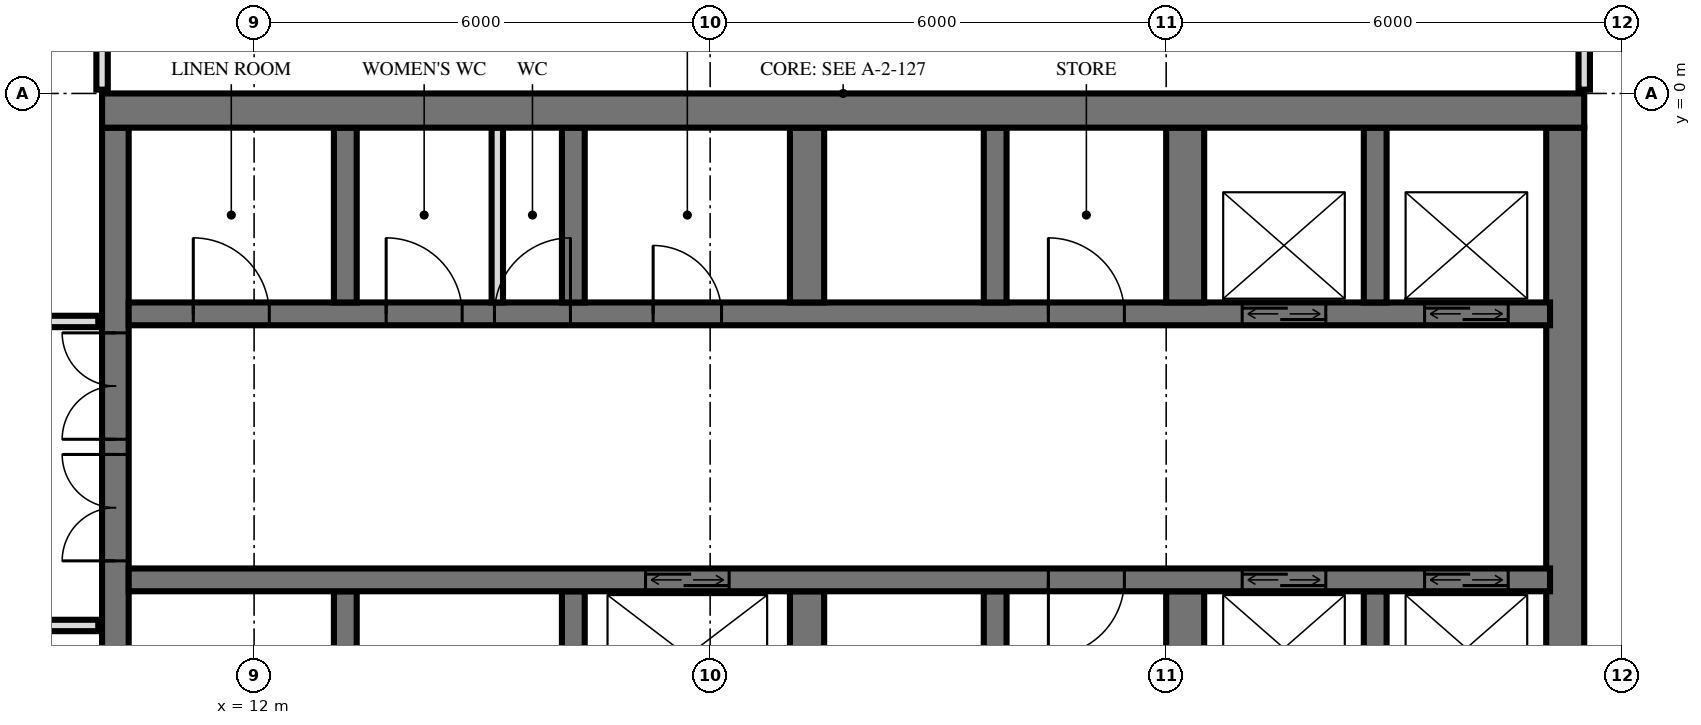
"""IFC4 building model, lengths in metres.
Left out: names, types, materials, properties, quantities, classifications, styles, units other than length and angle.
Written with IfcOpenShell. Run it as: python <this file> out.ifc"""

import sys

from ifc_helpers import new_model, si_unit, direction, frame, frame_2d, origin, place, context, subcontext, project, spatial, rectangle, extrude, element, fill, save


model = new_model("IFC4")
c1 = context("Model", 3, precision=1e-05, world=origin(), true_north=direction((0.0, 1.0)))
c2 = subcontext(c1, "Body", "Model", "MODEL_VIEW")
j1 = project(units=[si_unit("LENGTHUNIT", "METRE"), si_unit("PLANEANGLEUNIT", "RADIAN")], contexts=[c1])
p1 = place(None, origin())
s1 = spatial("IfcSite", under=j1, at=p1, CompositionType="ELEMENT")
p2 = place(p1, origin())
s2 = spatial("IfcBuilding", under=s1, at=p2, CompositionType="ELEMENT")
p3 = place(p2, frame((0.0, 0.0, 42.0)))
s3 = spatial("IfcBuildingStorey", under=s2, at=p3, CompositionType="ELEMENT", Elevation=42.0)
p4 = place(p3, frame((10.0, -0.225, 0.0), z_axis=(0.0, 0.0, 1.0), x_axis=(1.0, 0.0, 0.0)))
e1 = element("IfcWall", 1, at=p4, inside=s3, PredefinedType="SHEAR", context=c2, shape_type="SweptSolid", body=[
    extrude(rectangle(XDim=19.5, YDim=0.45, at=frame_2d((9.75, 0.0))), origin(), (0.0, 0.0, 1.0), 3.6),
])
p5 = place(p3, frame((10.175, -14.55, 0.0), z_axis=(0.0, 0.0, 1.0), x_axis=(0.0, 1.0, 0.0)))
e2 = element("IfcWall", 2, at=p5, inside=s3, PredefinedType="SHEAR", context=c2, shape_type="SweptSolid", body=[
    extrude(rectangle(XDim=14.1, YDim=0.35, at=frame_2d((7.05, 0.0))), origin(), (0.0, 0.0, 1.0), 3.6),
])
p6 = place(p5, frame((8.4, 0.0, 0.0)))
e3 = element("IfcOpeningElement", 3, at=p6, cuts=e2, PredefinedType="OPENING", context=c2, shape_type="SweptSolid", body=[
    extrude(rectangle(XDim=1.4, YDim=2.4, at=frame_2d((0.7, 1.2))), frame((0.0, 0.185, 0.0), z_axis=(0.0, -1.0, 0.0), x_axis=(1.0, 0.0, 0.0)), (0.0, 0.0, 1.0), 0.37),
])
p7 = place(p5, frame((10.0, 0.0, 0.0)))
e4 = element("IfcOpeningElement", 4, at=p7, cuts=e2, PredefinedType="OPENING", context=c2, shape_type="SweptSolid", body=[
    extrude(rectangle(XDim=1.4, YDim=2.4, at=frame_2d((0.7, 1.2))), frame((0.0, 0.185, 0.0), z_axis=(0.0, -1.0, 0.0), x_axis=(1.0, 0.0, 0.0)), (0.0, 0.0, 1.0), 0.37),
])
p8 = place(p5, frame((4.0, 0.0, 0.0)))
e5 = element("IfcOpeningElement", 5, at=p8, cuts=e2, PredefinedType="OPENING", context=c2, shape_type="SweptSolid", body=[
    extrude(rectangle(XDim=1.2, YDim=2.1, at=frame_2d((0.6, 1.05))), frame((0.0, 0.185, 0.0), z_axis=(0.0, -1.0, 0.0), x_axis=(1.0, 0.0, 0.0)), (0.0, 0.0, 1.0), 0.37),
])
p9 = place(p3, frame((29.25, -14.55, 0.0), z_axis=(0.0, 0.0, 1.0), x_axis=(0.0, 1.0, 0.0)))
e6 = element("IfcWall", 6, at=p9, inside=s3, PredefinedType="SHEAR", context=c2, shape_type="SweptSolid", body=[
    extrude(rectangle(XDim=14.1, YDim=0.5, at=frame_2d((7.05, 0.0))), origin(), (0.0, 0.0, 1.0), 3.6),
])
p10 = place(p3, frame((10.35, -2.9, 0.0), z_axis=(0.0, 0.0, 1.0), x_axis=(1.0, 0.0, 0.0)))
e7 = element("IfcWall", 7, at=p10, inside=s3, PredefinedType="SHEAR", context=c2, shape_type="SweptSolid", body=[
    extrude(rectangle(XDim=18.7, YDim=0.3, at=frame_2d((9.35, 0.0))), origin(), (0.0, 0.0, 1.0), 3.6),
])
p11 = place(p10, frame((14.65, 0.0, 0.0)))
e8 = element("IfcOpeningElement", 8, at=p11, cuts=e7, PredefinedType="OPENING", context=c2, shape_type="SweptSolid", body=[
    extrude(rectangle(XDim=1.1, YDim=2.1, at=frame_2d((0.55, 1.05))), frame((0.0, 0.16, 0.0), z_axis=(0.0, -1.0, 0.0), x_axis=(1.0, 0.0, 0.0)), (0.0, 0.0, 1.0), 0.32),
])
p12 = place(p10, frame((17.05, 0.0, 0.0)))
e9 = element("IfcOpeningElement", 9, at=p12, cuts=e7, PredefinedType="OPENING", context=c2, shape_type="SweptSolid", body=[
    extrude(rectangle(XDim=1.1, YDim=2.1, at=frame_2d((0.55, 1.05))), frame((0.0, 0.16, 0.0), z_axis=(0.0, -1.0, 0.0), x_axis=(1.0, 0.0, 0.0)), (0.0, 0.0, 1.0), 0.32),
])
p13 = place(p10, frame((6.9, 0.0, 0.0)))
e10 = element("IfcOpeningElement", 10, at=p13, cuts=e7, PredefinedType="OPENING", context=c2, shape_type="SweptSolid", body=[
    extrude(rectangle(XDim=0.9, YDim=2.1, at=frame_2d((0.45, 1.05))), frame((0.0, 0.16, 0.0), z_axis=(0.0, -1.0, 0.0), x_axis=(1.0, 0.0, 0.0)), (0.0, 0.0, 1.0), 0.32),
])
p14 = place(p10, frame((0.85, 0.0, 0.0)))
e11 = element("IfcOpeningElement", 11, at=p14, cuts=e7, PredefinedType="OPENING", context=c2, shape_type="SweptSolid", body=[
    extrude(rectangle(XDim=1.0, YDim=2.1, at=frame_2d((0.5, 1.05))), frame((0.0, 0.16, 0.0), z_axis=(0.0, -1.0, 0.0), x_axis=(1.0, 0.0, 0.0)), (0.0, 0.0, 1.0), 0.32),
])
p15 = place(p10, frame((3.387, 0.0, 0.0)))
e12 = element("IfcOpeningElement", 12, at=p15, cuts=e7, PredefinedType="OPENING", context=c2, shape_type="SweptSolid", body=[
    extrude(rectangle(XDim=1.0, YDim=2.1, at=frame_2d((0.5, 1.05))), frame((0.0, 0.16, 0.0), z_axis=(0.0, -1.0, 0.0), x_axis=(1.0, 0.0, 0.0)), (0.0, 0.0, 1.0), 0.32),
])
p16 = place(p10, frame((4.812, 0.0, 0.0)))
e13 = element("IfcOpeningElement", 13, at=p16, cuts=e7, PredefinedType="OPENING", context=c2, shape_type="SweptSolid", body=[
    extrude(rectangle(XDim=1.0, YDim=2.1, at=frame_2d((0.5, 1.05))), frame((0.0, 0.16, 0.0), z_axis=(0.0, -1.0, 0.0), x_axis=(1.0, 0.0, 0.0)), (0.0, 0.0, 1.0), 0.32),
])
p17 = place(p10, frame((12.1, 0.0, 0.0)))
e14 = element("IfcOpeningElement", 14, at=p17, cuts=e7, PredefinedType="OPENING", context=c2, shape_type="SweptSolid", body=[
    extrude(rectangle(XDim=1.0, YDim=2.1, at=frame_2d((0.5, 1.05))), frame((0.0, 0.16, 0.0), z_axis=(0.0, -1.0, 0.0), x_axis=(1.0, 0.0, 0.0)), (0.0, 0.0, 1.0), 0.32),
])
p18 = place(p3, frame((10.35, -6.4, 0.0), z_axis=(0.0, 0.0, 1.0), x_axis=(1.0, 0.0, 0.0)))
e15 = element("IfcWall", 15, at=p18, inside=s3, PredefinedType="SHEAR", context=c2, shape_type="SweptSolid", body=[
    extrude(rectangle(XDim=18.7, YDim=0.3, at=frame_2d((9.35, 0.0))), origin(), (0.0, 0.0, 1.0), 3.6),
])
p19 = place(p18, frame((14.65, 0.0, 0.0)))
e16 = element("IfcOpeningElement", 16, at=p19, cuts=e15, PredefinedType="OPENING", context=c2, shape_type="SweptSolid", body=[
    extrude(rectangle(XDim=1.1, YDim=2.1, at=frame_2d((0.55, 1.05))), frame((0.0, 0.16, 0.0), z_axis=(0.0, -1.0, 0.0), x_axis=(1.0, 0.0, 0.0)), (0.0, 0.0, 1.0), 0.32),
])
p20 = place(p18, frame((17.05, 0.0, 0.0)))
e17 = element("IfcOpeningElement", 17, at=p20, cuts=e15, PredefinedType="OPENING", context=c2, shape_type="SweptSolid", body=[
    extrude(rectangle(XDim=1.1, YDim=2.1, at=frame_2d((0.55, 1.05))), frame((0.0, 0.16, 0.0), z_axis=(0.0, -1.0, 0.0), x_axis=(1.0, 0.0, 0.0)), (0.0, 0.0, 1.0), 0.32),
])
p21 = place(p18, frame((6.8, 0.0, 0.0)))
e18 = element("IfcOpeningElement", 18, at=p21, cuts=e15, PredefinedType="OPENING", context=c2, shape_type="SweptSolid", body=[
    extrude(rectangle(XDim=1.1, YDim=2.1, at=frame_2d((0.55, 1.05))), frame((0.0, 0.16, 0.0), z_axis=(0.0, -1.0, 0.0), x_axis=(1.0, 0.0, 0.0)), (0.0, 0.0, 1.0), 0.32),
])
p22 = place(p18, frame((12.1, 0.0, 0.0)))
e19 = element("IfcOpeningElement", 19, at=p22, cuts=e15, PredefinedType="OPENING", context=c2, shape_type="SweptSolid", body=[
    extrude(rectangle(XDim=1.0, YDim=2.1, at=frame_2d((0.5, 1.05))), frame((0.0, 0.16, 0.0), z_axis=(0.0, -1.0, 0.0), x_axis=(1.0, 0.0, 0.0)), (0.0, 0.0, 1.0), 0.32),
])
for number, where, z_axis, x_axis in (
    (20, (13.2, -2.75, 0.0), (0.0, 0.0, 1.0), (0.0, 1.0, 0.0)),
    (21, (13.2, -8.85, 0.0), (0.0, 0.0, 1.0), (0.0, 1.0, 0.0)),
    (22, (16.2, -2.75, 0.0), (0.0, 0.0, 1.0), (0.0, 1.0, 0.0)),
    (23, (16.2, -8.85, 0.0), (0.0, 0.0, 1.0), (0.0, 1.0, 0.0)),
):
    element("IfcWall", number, at=place(p3, frame(where, z_axis=z_axis, x_axis=x_axis)), inside=s3, PredefinedType="SHEAR", context=c2, shape_type="SweptSolid", body=[
        extrude(rectangle(XDim=2.3, YDim=0.3, at=frame_2d((1.15, 0.0))), origin(), (0.0, 0.0, 1.0), 3.6),
    ])
for number, where, z_axis, x_axis in (
    (24, (19.275, -2.75, 0.0), (0.0, 0.0, 1.0), (0.0, 1.0, 0.0)),
    (25, (19.275, -8.85, 0.0), (0.0, 0.0, 1.0), (0.0, 1.0, 0.0)),
):
    element("IfcWall", number, at=place(p3, frame(where, z_axis=z_axis, x_axis=x_axis)), inside=s3, PredefinedType="SHEAR", context=c2, shape_type="SweptSolid", body=[
        extrude(rectangle(XDim=2.3, YDim=0.45, at=frame_2d((1.15, 0.0))), origin(), (0.0, 0.0, 1.0), 3.6),
    ])
for number, where, z_axis, x_axis in (
    (26, (21.75, -2.75, 0.0), (0.0, 0.0, 1.0), (0.0, 1.0, 0.0)),
    (27, (21.75, -8.85, 0.0), (0.0, 0.0, 1.0), (0.0, 1.0, 0.0)),
):
    element("IfcWall", number, at=place(p3, frame(where, z_axis=z_axis, x_axis=x_axis)), inside=s3, PredefinedType="SHEAR", context=c2, shape_type="SweptSolid", body=[
        extrude(rectangle(XDim=2.3, YDim=0.3, at=frame_2d((1.15, 0.0))), origin(), (0.0, 0.0, 1.0), 3.6),
    ])
for number, where, z_axis, x_axis in (
    (28, (24.25, -2.75, 0.0), (0.0, 0.0, 1.0), (0.0, 1.0, 0.0)),
    (29, (24.25, -8.85, 0.0), (0.0, 0.0, 1.0), (0.0, 1.0, 0.0)),
):
    element("IfcWall", number, at=place(p3, frame(where, z_axis=z_axis, x_axis=x_axis)), inside=s3, PredefinedType="SHEAR", context=c2, shape_type="SweptSolid", body=[
        extrude(rectangle(XDim=2.3, YDim=0.5, at=frame_2d((1.15, 0.0))), origin(), (0.0, 0.0, 1.0), 3.6),
    ])
for number, where, z_axis, x_axis in (
    (30, (26.75, -2.75, 0.0), (0.0, 0.0, 1.0), (0.0, 1.0, 0.0)),
    (31, (26.75, -8.85, 0.0), (0.0, 0.0, 1.0), (0.0, 1.0, 0.0)),
):
    element("IfcWall", number, at=place(p3, frame(where, z_axis=z_axis, x_axis=x_axis)), inside=s3, PredefinedType="SHEAR", context=c2, shape_type="SweptSolid", body=[
        extrude(rectangle(XDim=2.3, YDim=0.3, at=frame_2d((1.15, 0.0))), origin(), (0.0, 0.0, 1.0), 3.6),
    ])
p23 = place(p3, frame((15.2, -2.75, 0.0), z_axis=(0.0, 0.0, 1.0), x_axis=(0.0, 1.0, 0.0)))
e32 = element("IfcWall", 32, at=p23, inside=s3, PredefinedType="PARTITIONING", context=c2, shape_type="SweptSolid", body=[
    extrude(rectangle(XDim=2.3, YDim=0.15, at=frame_2d((1.15, 0.0))), origin(), (0.0, 0.0, 1.0), 3.3),
])
p24 = place(p3, frame((29.5, 0.05, 0.0), z_axis=(0.0, 0.0, 1.0), x_axis=(0.0, 1.0, 0.0)))
e33 = element("IfcWall", 33, at=p24, inside=s3, PredefinedType="PARTITIONING", context=c2, shape_type="SweptSolid", body=[
    extrude(rectangle(XDim=0.827, YDim=0.15, at=frame_2d((0.414, 0.0))), origin(), (0.0, 0.0, 1.0), 3.32),
])
p25 = place(p3, frame((10.0, 0.05, 0.0), z_axis=(0.0, 0.0, 1.0), x_axis=(0.0, 1.0, 0.0)))
e34 = element("IfcWall", 34, at=p25, inside=s3, PredefinedType="PARTITIONING", context=c2, shape_type="SweptSolid", body=[
    extrude(rectangle(XDim=0.97, YDim=0.15, at=frame_2d((0.485, 0.0))), origin(), (0.0, 0.0, 1.0), 3.32),
])
p26 = place(p3, frame((-9.95, -7.0, 0.0), z_axis=(0.0, 0.0, 1.0), x_axis=(1.0, 0.0, 0.0)))
e35 = element("IfcWall", 35, at=p26, inside=s3, PredefinedType="PARTITIONING", context=c2, shape_type="SweptSolid", body=[
    extrude(rectangle(XDim=19.9, YDim=0.15, at=frame_2d((9.95, 0.0))), origin(), (0.0, 0.0, 1.0), 3.32),
])
p27 = place(p26, frame((9.45, 0.0, 0.0)))
e36 = element("IfcOpeningElement", 36, at=p27, cuts=e35, PredefinedType="OPENING", context=c2, shape_type="SweptSolid", body=[
    extrude(rectangle(XDim=1.0, YDim=2.1, at=frame_2d((0.5, 1.05))), frame((0.0, 0.085, 0.0), z_axis=(0.0, -1.0, 0.0), x_axis=(1.0, 0.0, 0.0)), (0.0, 0.0, 1.0), 0.17),
])
p28 = place(p26, frame((15.45, 0.0, 0.0)))
e37 = element("IfcOpeningElement", 37, at=p28, cuts=e35, PredefinedType="OPENING", context=c2, shape_type="SweptSolid", body=[
    extrude(rectangle(XDim=1.0, YDim=2.1, at=frame_2d((0.5, 1.05))), frame((0.0, 0.085, 0.0), z_axis=(0.0, -1.0, 0.0), x_axis=(1.0, 0.0, 0.0)), (0.0, 0.0, 1.0), 0.17),
])
p29 = place(p3, frame((-9.95, -3.0, 0.0), z_axis=(0.0, 0.0, 1.0), x_axis=(1.0, 0.0, 0.0)))
e38 = element("IfcWall", 38, at=p29, inside=s3, PredefinedType="PARTITIONING", context=c2, shape_type="SweptSolid", body=[
    extrude(rectangle(XDim=19.9, YDim=0.15, at=frame_2d((9.95, 0.0))), origin(), (0.0, 0.0, 1.0), 3.32),
])
p30 = place(p29, frame((1.7, 0.0, 0.0)))
e39 = element("IfcOpeningElement", 39, at=p30, cuts=e38, PredefinedType="OPENING", context=c2, shape_type="SweptSolid", body=[
    extrude(rectangle(XDim=1.0, YDim=2.1, at=frame_2d((0.5, 1.05))), frame((0.0, 0.085, 0.0), z_axis=(0.0, -1.0, 0.0), x_axis=(1.0, 0.0, 0.0)), (0.0, 0.0, 1.0), 0.17),
])
p31 = place(p29, frame((5.45, 0.0, 0.0)))
e40 = element("IfcOpeningElement", 40, at=p31, cuts=e38, PredefinedType="OPENING", context=c2, shape_type="SweptSolid", body=[
    extrude(rectangle(XDim=1.0, YDim=2.1, at=frame_2d((0.5, 1.05))), frame((0.0, 0.085, 0.0), z_axis=(0.0, -1.0, 0.0), x_axis=(1.0, 0.0, 0.0)), (0.0, 0.0, 1.0), 0.17),
])
p32 = place(p29, frame((8.2, 0.0, 0.0)))
e41 = element("IfcOpeningElement", 41, at=p32, cuts=e38, PredefinedType="OPENING", context=c2, shape_type="SweptSolid", body=[
    extrude(rectangle(XDim=1.0, YDim=2.1, at=frame_2d((0.5, 1.05))), frame((0.0, 0.085, 0.0), z_axis=(0.0, -1.0, 0.0), x_axis=(1.0, 0.0, 0.0)), (0.0, 0.0, 1.0), 0.17),
])
p33 = place(p29, frame((11.95, 0.0, 0.0)))
e42 = element("IfcOpeningElement", 42, at=p33, cuts=e38, PredefinedType="OPENING", context=c2, shape_type="SweptSolid", body=[
    extrude(rectangle(XDim=1.0, YDim=2.1, at=frame_2d((0.5, 1.05))), frame((0.0, 0.085, 0.0), z_axis=(0.0, -1.0, 0.0), x_axis=(1.0, 0.0, 0.0)), (0.0, 0.0, 1.0), 0.17),
])
p34 = place(p29, frame((16.95, 0.0, 0.0)))
e43 = element("IfcOpeningElement", 43, at=p34, cuts=e38, PredefinedType="OPENING", context=c2, shape_type="SweptSolid", body=[
    extrude(rectangle(XDim=1.0, YDim=2.1, at=frame_2d((0.5, 1.05))), frame((0.0, 0.085, 0.0), z_axis=(0.0, -1.0, 0.0), x_axis=(1.0, 0.0, 0.0)), (0.0, 0.0, 1.0), 0.17),
])
p35 = place(p11, origin())
e44 = element("IfcDoor", 44, at=p35, inside=s3, OperationType="DOUBLE_DOOR_SLIDING", PredefinedType="USERDEFINED", context=c2, shape_type="SweptSolid", body=[
    extrude(rectangle(XDim=1.1, YDim=2.1, at=frame_2d((0.55, 1.05))), frame((0.0, 0.025, 0.0), z_axis=(0.0, -1.0, 0.0), x_axis=(1.0, 0.0, 0.0)), (0.0, 0.0, 1.0), 0.05),
])
fill(e8, e44)
p36 = place(p12, origin())
e45 = element("IfcDoor", 45, at=p36, inside=s3, OperationType="DOUBLE_DOOR_SLIDING", PredefinedType="USERDEFINED", context=c2, shape_type="SweptSolid", body=[
    extrude(rectangle(XDim=1.1, YDim=2.1, at=frame_2d((0.55, 1.05))), frame((0.0, 0.025, 0.0), z_axis=(0.0, -1.0, 0.0), x_axis=(1.0, 0.0, 0.0)), (0.0, 0.0, 1.0), 0.05),
])
fill(e9, e45)
p37 = place(p19, origin())
e46 = element("IfcDoor", 46, at=p37, inside=s3, OperationType="DOUBLE_DOOR_SLIDING", PredefinedType="USERDEFINED", context=c2, shape_type="SweptSolid", body=[
    extrude(rectangle(XDim=1.1, YDim=2.1, at=frame_2d((0.55, 1.05))), frame((0.0, 0.025, 0.0), z_axis=(0.0, -1.0, 0.0), x_axis=(1.0, 0.0, 0.0)), (0.0, 0.0, 1.0), 0.05),
])
fill(e16, e46)
p38 = place(p20, origin())
e47 = element("IfcDoor", 47, at=p38, inside=s3, OperationType="DOUBLE_DOOR_SLIDING", PredefinedType="USERDEFINED", context=c2, shape_type="SweptSolid", body=[
    extrude(rectangle(XDim=1.1, YDim=2.1, at=frame_2d((0.55, 1.05))), frame((0.0, 0.025, 0.0), z_axis=(0.0, -1.0, 0.0), x_axis=(1.0, 0.0, 0.0)), (0.0, 0.0, 1.0), 0.05),
])
fill(e17, e47)
p39 = place(p21, origin())
e48 = element("IfcDoor", 48, at=p39, inside=s3, OperationType="DOUBLE_DOOR_SLIDING", PredefinedType="USERDEFINED", context=c2, shape_type="SweptSolid", body=[
    extrude(rectangle(XDim=1.1, YDim=2.1, at=frame_2d((0.55, 1.05))), frame((0.0, 0.025, 0.0), z_axis=(0.0, -1.0, 0.0), x_axis=(1.0, 0.0, 0.0)), (0.0, 0.0, 1.0), 0.05),
])
fill(e18, e48)
p40 = place(p6, origin())
e49 = element("IfcDoor", 49, at=p40, inside=s3, OperationType="DOUBLE_DOOR_SINGLE_SWING", PredefinedType="DOOR", context=c2, shape_type="SweptSolid", body=[
    extrude(rectangle(XDim=1.4, YDim=2.4, at=frame_2d((0.7, 1.2))), frame((0.0, 0.025, 0.0), z_axis=(0.0, -1.0, 0.0), x_axis=(1.0, 0.0, 0.0)), (0.0, 0.0, 1.0), 0.05),
])
fill(e3, e49)
p41 = place(p7, origin())
e50 = element("IfcDoor", 50, at=p41, inside=s3, OperationType="DOUBLE_DOOR_SINGLE_SWING", PredefinedType="DOOR", context=c2, shape_type="SweptSolid", body=[
    extrude(rectangle(XDim=1.4, YDim=2.4, at=frame_2d((0.7, 1.2))), frame((0.0, 0.025, 0.0), z_axis=(0.0, -1.0, 0.0), x_axis=(1.0, 0.0, 0.0)), (0.0, 0.0, 1.0), 0.05),
])
fill(e4, e50)
p42 = place(p13, origin())
e51 = element("IfcDoor", 51, at=p42, inside=s3, OperationType="SINGLE_SWING_RIGHT", PredefinedType="DOOR", context=c2, shape_type="SweptSolid", body=[
    extrude(rectangle(XDim=0.9, YDim=2.1, at=frame_2d((0.45, 1.05))), frame((0.0, 0.025, 0.0), z_axis=(0.0, -1.0, 0.0), x_axis=(1.0, 0.0, 0.0)), (0.0, 0.0, 1.0), 0.05),
])
fill(e10, e51)
p43 = place(p14, origin())
e52 = element("IfcDoor", 52, at=p43, inside=s3, OperationType="SINGLE_SWING_RIGHT", PredefinedType="DOOR", context=c2, shape_type="SweptSolid", body=[
    extrude(rectangle(XDim=1.0, YDim=2.1, at=frame_2d((0.5, 1.05))), frame((0.0, 0.025, 0.0), z_axis=(0.0, -1.0, 0.0), x_axis=(1.0, 0.0, 0.0)), (0.0, 0.0, 1.0), 0.05),
])
fill(e11, e52)
p44 = place(p15, origin())
e53 = element("IfcDoor", 53, at=p44, inside=s3, OperationType="SINGLE_SWING_RIGHT", PredefinedType="DOOR", context=c2, shape_type="SweptSolid", body=[
    extrude(rectangle(XDim=1.0, YDim=2.1, at=frame_2d((0.5, 1.05))), frame((0.0, 0.025, 0.0), z_axis=(0.0, -1.0, 0.0), x_axis=(1.0, 0.0, 0.0)), (0.0, 0.0, 1.0), 0.05),
])
fill(e12, e53)
p45 = place(p16, origin())
e54 = element("IfcDoor", 54, at=p45, inside=s3, OperationType="SINGLE_SWING_LEFT", PredefinedType="DOOR", context=c2, shape_type="SweptSolid", body=[
    extrude(rectangle(XDim=1.0, YDim=2.1, at=frame_2d((0.5, 1.05))), frame((0.0, 0.025, 0.0), z_axis=(0.0, -1.0, 0.0), x_axis=(1.0, 0.0, 0.0)), (0.0, 0.0, 1.0), 0.05),
])
fill(e13, e54)
p46 = place(p17, origin())
e55 = element("IfcDoor", 55, at=p46, inside=s3, OperationType="SINGLE_SWING_RIGHT", PredefinedType="DOOR", context=c2, shape_type="SweptSolid", body=[
    extrude(rectangle(XDim=1.0, YDim=2.1, at=frame_2d((0.5, 1.05))), frame((0.0, 0.025, 0.0), z_axis=(0.0, -1.0, 0.0), x_axis=(1.0, 0.0, 0.0)), (0.0, 0.0, 1.0), 0.05),
])
fill(e14, e55)
p47 = place(p22, frame((0.5, 0.0, 0.0), z_axis=(0.0, 0.0, 1.0), x_axis=(-1.0, 0.0, 0.0)))
e56 = element("IfcDoor", 56, at=p47, inside=s3, OperationType="SINGLE_SWING_LEFT", PredefinedType="DOOR", context=c2, shape_type="SweptSolid", body=[
    extrude(rectangle(XDim=1.0, YDim=2.1, at=frame_2d((0.0, 1.05))), frame((0.0, -0.025, 0.0), z_axis=(0.0, 1.0, 0.0), x_axis=(-1.0, 0.0, 0.0)), (0.0, 0.0, 1.0), 0.05),
])
fill(e19, e56)
save(model, sys.argv[1])
